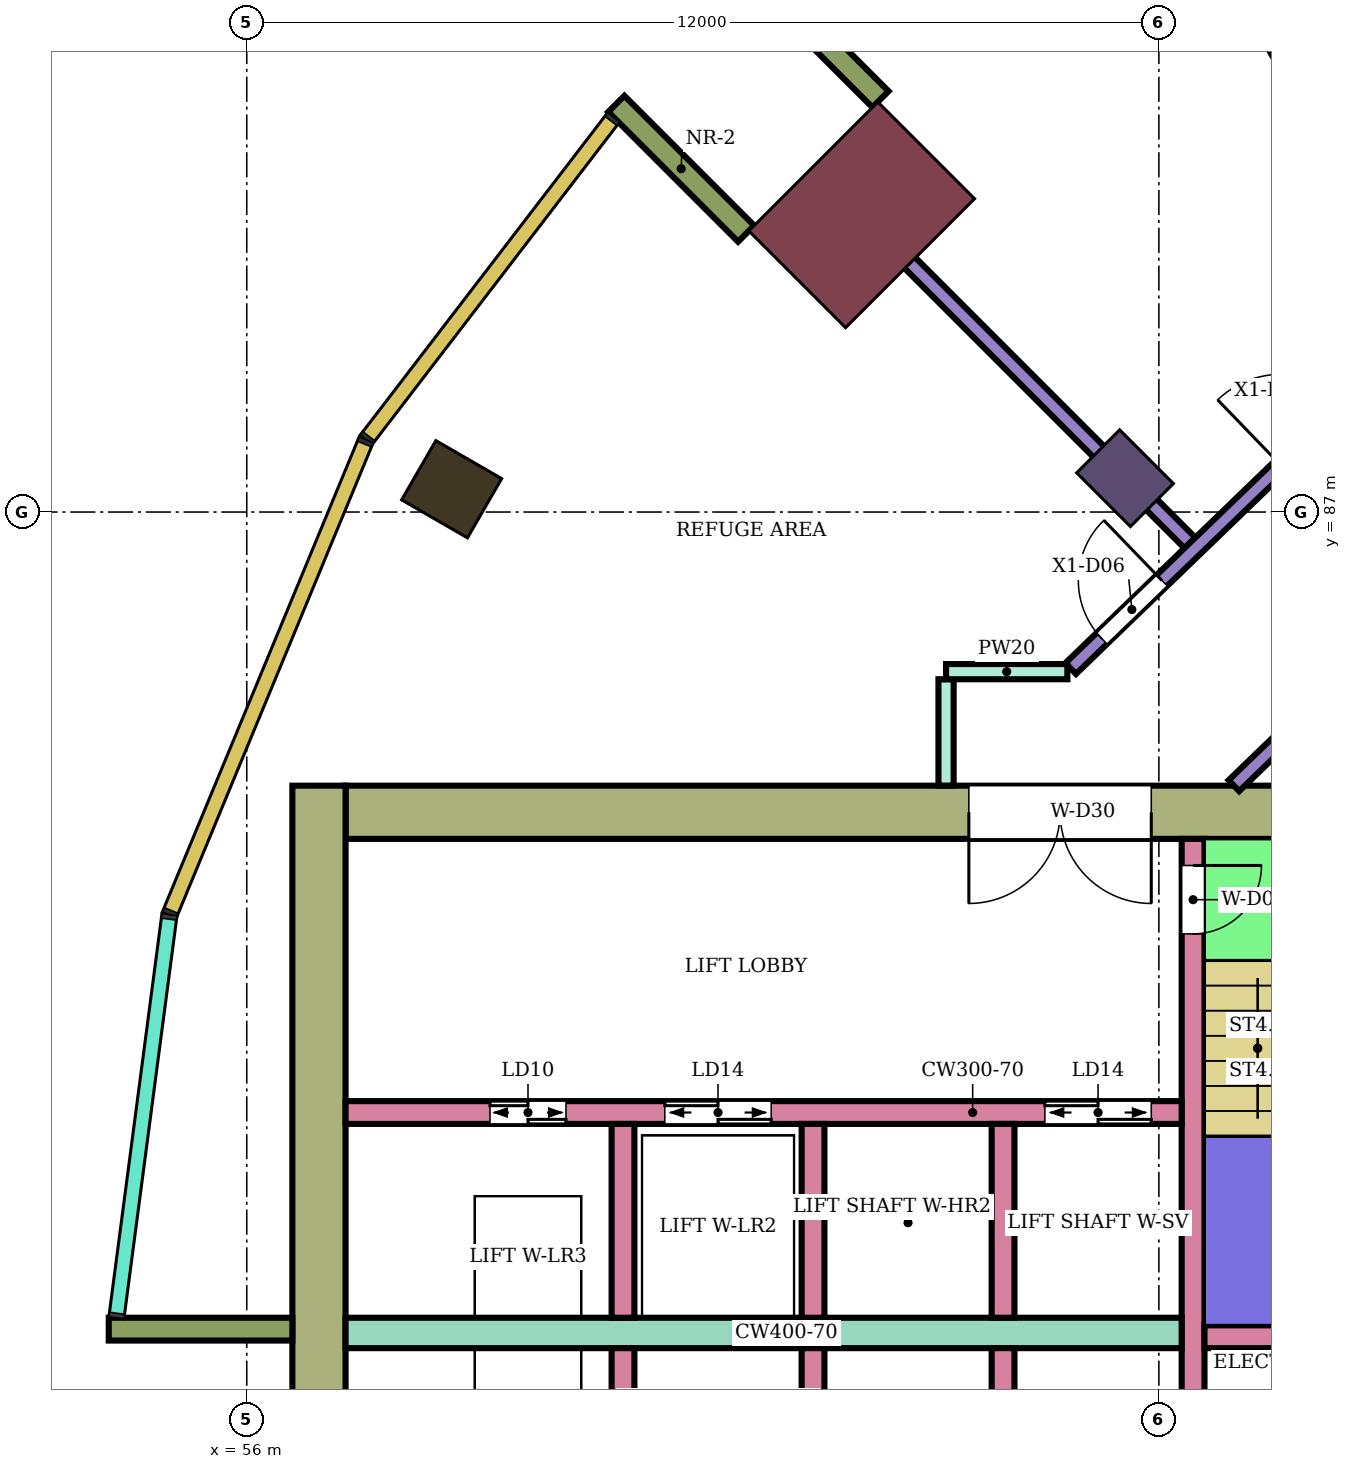
"""IFC4 building model, lengths in metres.
Left out: names, types, materials, properties, quantities, classifications, styles, units other than length and angle.
Written with IfcOpenShell. Run it as: python <this file> out.ifc"""

import sys

from ifc_helpers import new_model, si_unit, direction, frame, frame_2d, origin, origin_2d, place, context, subcontext, project, spatial, rectangle, extrude, element, fill, save


model = new_model("IFC4")
c1 = context("Model", 3, precision=1e-05, world=origin(), true_north=direction((0.0, 1.0)))
c2 = subcontext(c1, "Body", "Model", "MODEL_VIEW")
j1 = project(units=[si_unit("LENGTHUNIT", "METRE"), si_unit("PLANEANGLEUNIT", "RADIAN")], contexts=[c1])
p1 = place(None, origin())
s1 = spatial("IfcSite", under=j1, at=p1, CompositionType="ELEMENT")
p2 = place(p1, origin())
s2 = spatial("IfcBuilding", under=s1, at=p2, CompositionType="ELEMENT")
p3 = place(p2, frame((0.0, 0.0, 109.0)))
s3 = spatial("IfcBuildingStorey", under=s2, at=p3, CompositionType="ELEMENT", Elevation=109.0)
p4 = place(p3, frame((58.696, 87.3, 0.0), z_axis=(0.0, 0.0, 1.0), x_axis=(-0.866025403784, 0.5, 0.0)))
e1 = element("IfcColumn", 1, at=p4, inside=s3, PredefinedType="COLUMN", context=c2, shape_type="SweptSolid", body=[
    extrude(rectangle(XDim=1.0, YDim=0.9, at=origin_2d()), origin(), (0.0, 0.0, 1.0), 5.6),
])
p5 = place(p3, frame((67.555, 87.445, 0.0), z_axis=(0.0, 0.0, 1.0), x_axis=(-0.707106781187, 0.707106781187, 0.0)))
e2 = element("IfcColumn", 2, at=p5, inside=s3, PredefinedType="COLUMN", context=c2, shape_type="SweptSolid", body=[
    extrude(rectangle(XDim=1.0, YDim=0.8, at=origin_2d()), origin(), (0.0, 0.0, 1.0), 5.6),
])
p6 = place(p3, frame((64.09, 90.91, 0.0), z_axis=(0.0, 0.0, 1.0), x_axis=(-0.707106781187, 0.707106781187, 0.0)))
e3 = element("IfcColumn", 3, at=p6, inside=s3, PredefinedType="COLUMN", context=c2, shape_type="SweptSolid", body=[
    extrude(rectangle(XDim=1.8, YDim=2.4, at=origin_2d()), origin(), (0.0, 0.0, 1.0), 5.6),
])
p7 = place(p3, frame((72.1, 83.05, 0.0), z_axis=(0.0, 0.0, 1.0), x_axis=(-1.0, 0.0, 0.0)))
e4 = element("IfcWall", 4, at=p7, inside=s3, PredefinedType="SHEAR", context=c2, shape_type="SweptSolid", body=[
    extrude(rectangle(XDim=14.8, YDim=0.7, at=frame_2d((7.4, 0.0))), origin(), (0.0, 0.0, 1.0), 5.28),
])
p8 = place(p7, frame((4.2, 0.0, 0.0)))
e5 = element("IfcOpeningElement", 5, at=p8, cuts=e4, PredefinedType="OPENING", context=c2, shape_type="SweptSolid", body=[
    extrude(rectangle(XDim=2.4, YDim=2.4, at=frame_2d((1.2, 1.2))), frame((0.0, 0.36, 0.0), z_axis=(0.0, -1.0, 0.0), x_axis=(1.0, 0.0, 0.0)), (0.0, 0.0, 1.0), 0.72),
])
p9 = place(p3, frame((56.95, 83.4, 0.0), z_axis=(0.0, 0.0, 1.0), x_axis=(0.0, -1.0, 0.0)))
e6 = element("IfcWall", 6, at=p9, inside=s3, PredefinedType="SHEAR", context=c2, shape_type="SweptSolid", body=[
    extrude(rectangle(XDim=16.8, YDim=0.7, at=frame_2d((8.4, 0.0))), origin(), (0.0, 0.0, 1.0), 5.28),
])
p10 = place(p3, frame((68.45, 82.7, 0.0), z_axis=(0.0, 0.0, 1.0), x_axis=(0.0, -1.0, 0.0)))
e7 = element("IfcWall", 7, at=p10, inside=s3, PredefinedType="SHEAR", context=c2, shape_type="SweptSolid", body=[
    extrude(rectangle(XDim=7.7, YDim=0.3, at=frame_2d((3.85, 0.0))), origin(), (0.0, 0.0, 1.0), 5.28),
])
p11 = place(p10, frame((0.35, 0.0, 0.0)))
e8 = element("IfcOpeningElement", 8, at=p11, cuts=e7, PredefinedType="OPENING", context=c2, shape_type="SweptSolid", body=[
    extrude(rectangle(XDim=0.9, YDim=2.1, at=frame_2d((0.45, 1.05))), frame((0.0, 0.16, 0.0), z_axis=(0.0, -1.0, 0.0), x_axis=(1.0, 0.0, 0.0)), (0.0, 0.0, 1.0), 0.32),
])
p12 = place(p3, frame((71.65, 76.15, 0.0), z_axis=(0.0, 0.0, 1.0), x_axis=(-1.0, 0.0, 0.0)))
e9 = element("IfcWall", 9, at=p12, inside=s3, PredefinedType="SHEAR", context=c2, shape_type="SweptSolid", body=[
    extrude(rectangle(XDim=3.05, YDim=0.3, at=frame_2d((1.525, 0.0))), origin(), (0.0, 0.0, 1.0), 5.28),
])
p13 = place(p3, frame((68.3, 76.2, 0.0), z_axis=(0.0, 0.0, 1.0), x_axis=(-1.0, 0.0, 0.0)))
e10 = element("IfcWall", 10, at=p13, inside=s3, PredefinedType="SHEAR", context=c2, shape_type="SweptSolid", body=[
    extrude(rectangle(XDim=11.0, YDim=0.4, at=frame_2d((5.5, 0.0))), origin(), (0.0, 0.0, 1.0), 5.28),
])
p14 = place(p3, frame((68.3, 79.1, 0.0), z_axis=(0.0, 0.0, 1.0), x_axis=(-1.0, 0.0, 0.0)))
e11 = element("IfcWall", 11, at=p14, inside=s3, PredefinedType="SHEAR", context=c2, shape_type="SweptSolid", body=[
    extrude(rectangle(XDim=11.0, YDim=0.3, at=frame_2d((5.5, 0.0))), origin(), (0.0, 0.0, 1.0), 5.28),
])
p15 = place(p14, frame((0.4, 0.0, 0.0)))
e12 = element("IfcOpeningElement", 12, at=p15, cuts=e11, PredefinedType="OPENING", context=c2, shape_type="SweptSolid", body=[
    extrude(rectangle(XDim=1.4, YDim=2.1, at=frame_2d((0.7, 1.05))), frame((0.0, 0.16, 0.0), z_axis=(0.0, -1.0, 0.0), x_axis=(1.0, 0.0, 0.0)), (0.0, 0.0, 1.0), 0.32),
])
p16 = place(p14, frame((5.4, 0.0, 0.0)))
e13 = element("IfcOpeningElement", 13, at=p16, cuts=e11, PredefinedType="OPENING", context=c2, shape_type="SweptSolid", body=[
    extrude(rectangle(XDim=1.4, YDim=2.1, at=frame_2d((0.7, 1.05))), frame((0.0, 0.16, 0.0), z_axis=(0.0, -1.0, 0.0), x_axis=(1.0, 0.0, 0.0)), (0.0, 0.0, 1.0), 0.32),
])
p17 = place(p14, frame((8.1, 0.0, 0.0)))
e14 = element("IfcOpeningElement", 14, at=p17, cuts=e11, PredefinedType="OPENING", context=c2, shape_type="SweptSolid", body=[
    extrude(rectangle(XDim=1.0, YDim=2.1, at=frame_2d((0.5, 1.05))), frame((0.0, 0.16, 0.0), z_axis=(0.0, -1.0, 0.0), x_axis=(1.0, 0.0, 0.0)), (0.0, 0.0, 1.0), 0.32),
])
for number, where, z_axis, x_axis in (
    (15, (65.95, 76.0, 0.0), (0.0, 0.0, 1.0), (0.0, -1.0, 0.0)),
    (16, (63.45, 76.0, 0.0), (0.0, 0.0, 1.0), (0.0, -1.0, 0.0)),
    (17, (60.95, 76.0, 0.0), (0.0, 0.0, 1.0), (0.0, -1.0, 0.0)),
    (18, (65.95, 78.95, 0.0), (0.0, 0.0, 1.0), (0.0, -1.0, 0.0)),
    (19, (63.45, 78.95, 0.0), (0.0, 0.0, 1.0), (0.0, -1.0, 0.0)),
    (20, (60.95, 78.95, 0.0), (0.0, 0.0, 1.0), (0.0, -1.0, 0.0)),
):
    element("IfcWall", number, at=place(p3, frame(where, z_axis=z_axis, x_axis=x_axis)), inside=s3, PredefinedType="SHEAR", context=c2, shape_type="SweptSolid", body=[
        extrude(rectangle(XDim=2.55, YDim=0.3, at=frame_2d((1.275, 0.0))), origin(), (0.0, 0.0, 1.0), 5.28),
    ])
for number, where, z_axis, x_axis in (
    (21, (64.338, 92.43, 0.0), (0.0, 0.0, 1.0), (-0.707, 0.707, 0.0)),
    (22, (62.57, 90.662, 0.0), (0.0, 0.0, 1.0), (-0.707, 0.707, 0.0)),
    (23, (56.6, 76.25, 0.0), (0.0, 0.0, 1.0), (-1.0, 0.0, 0.0)),
):
    element("IfcWall", number, at=place(p3, frame(where, z_axis=z_axis, x_axis=x_axis)), inside=s3, PredefinedType="NOTDEFINED", context=c2, shape_type="SweptSolid", body=[
        extrude(rectangle(XDim=2.416, YDim=0.3, at=frame_2d((1.208, 0.0))), origin(), (0.0, 0.0, 1.0), 5.6),
    ])
p18 = place(p3, frame((63.597, 91.406, 0.0), z_axis=(0.0, 0.0, 1.0), x_axis=(0.707035026478, -0.707178528614, 0.0)))
e24 = element("IfcWall", 24, at=p18, inside=s3, PredefinedType="PARTITIONING", context=c2, shape_type="SweptSolid", body=[
    extrude(rectangle(XDim=6.805, YDim=0.2, at=frame_2d((3.403, 0.0))), origin(), (0.0, 0.0, 1.0), 5.15),
])
p19 = place(p3, frame((66.84, 84.941, 0.0), z_axis=(0.0, 0.0, 1.0), x_axis=(0.719566481028, 0.694423559062, 0.0)))
e25 = element("IfcWall", 25, at=p19, inside=s3, PredefinedType="PARTITIONING", context=c2, shape_type="SweptSolid", body=[
    extrude(rectangle(XDim=6.525, YDim=0.2, at=frame_2d((3.263, 0.0))), origin(), (0.0, 0.0, 1.0), 5.15),
])
p20 = place(p19, frame((3.846, 0.0, 0.0)))
e26 = element("IfcOpeningElement", 26, at=p20, cuts=e25, PredefinedType="OPENING", context=c2, shape_type="SweptSolid", body=[
    extrude(rectangle(XDim=1.2, YDim=2.4, at=frame_2d((0.6, 1.2))), frame((0.0, 0.11, 0.0), z_axis=(0.0, -1.0, 0.0), x_axis=(1.0, 0.0, 0.0)), (0.0, 0.0, 1.0), 0.22),
])
p21 = place(p19, frame((0.568, 0.0, 0.0)))
e27 = element("IfcOpeningElement", 27, at=p21, cuts=e25, PredefinedType="OPENING", context=c2, shape_type="SweptSolid", body=[
    extrude(rectangle(XDim=1.1, YDim=2.1, at=frame_2d((0.55, 1.05))), frame((0.0, 0.11, 0.0), z_axis=(0.0, -1.0, 0.0), x_axis=(1.0, 0.0, 0.0)), (0.0, 0.0, 1.0), 0.22),
])
p22 = place(p3, frame((67.102, 97.342, 0.0), z_axis=(0.0, 0.0, 1.0), x_axis=(0.499997660635, -0.866026754413, 0.0)))
e28 = element("IfcWall", 28, at=p22, inside=s3, PredefinedType="PARTITIONING", context=c2, shape_type="SweptSolid", body=[
    extrude(rectangle(XDim=8.908, YDim=0.2, at=frame_2d((4.454, 0.0))), origin(), (0.0, 0.0, 1.0), 4.586),
])
p23 = place(p3, frame((68.987, 83.4, 0.0), z_axis=(0.0, 0.0, 1.0), x_axis=(0.719547721855, 0.694442996922, 0.0)))
e29 = element("IfcWall", 29, at=p23, inside=s3, PredefinedType="PARTITIONING", context=c2, shape_type="SweptSolid", body=[
    extrude(rectangle(XDim=5.378, YDim=0.2, at=frame_2d((2.689, 0.0))), origin(), (0.0, 0.0, 1.0), 5.15),
])
p24 = place(p23, frame((2.144, 0.0, 0.0)))
e30 = element("IfcOpeningElement", 30, at=p24, cuts=e29, PredefinedType="OPENING", context=c2, shape_type="SweptSolid", body=[
    extrude(rectangle(XDim=1.2, YDim=2.4, at=frame_2d((0.6, 1.2))), frame((0.0, 0.11, 0.0), z_axis=(0.0, -1.0, 0.0), x_axis=(1.0, 0.0, 0.0)), (0.0, 0.0, 1.0), 0.22),
])
p25 = place(p3, frame((65.2, 83.401, 0.0), z_axis=(0.0, 0.0, 1.0), x_axis=(0.0, 1.0, 0.0)))
e31 = element("IfcWall", 31, at=p25, inside=s3, PredefinedType="PARTITIONING", context=c2, shape_type="SweptSolid", body=[
    extrude(rectangle(XDim=1.399, YDim=0.2, at=frame_2d((0.7, 0.0))), origin(), (0.0, 0.0, 1.0), 5.15),
])
p26 = place(p3, frame((65.2, 84.9, 0.0), z_axis=(0.0, 0.0, 1.0), x_axis=(1.0, 0.0, 0.0)))
e32 = element("IfcWall", 32, at=p26, inside=s3, PredefinedType="PARTITIONING", context=c2, shape_type="SweptSolid", body=[
    extrude(rectangle(XDim=1.596, YDim=0.2, at=frame_2d((0.798, 0.0))), origin(), (0.0, 0.0, 1.0), 5.15),
])
p27 = place(p21, origin())
e33 = element("IfcDoor", 33, at=p27, inside=s3, OperationType="SINGLE_SWING_RIGHT", PredefinedType="DOOR", context=c2, shape_type="SweptSolid", body=[
    extrude(rectangle(XDim=1.1, YDim=2.1, at=frame_2d((0.55, 1.05))), frame((0.0, 0.025, 0.0), z_axis=(0.0, -1.0, 0.0), x_axis=(1.0, 0.0, 0.0)), (0.0, 0.0, 1.0), 0.05),
])
fill(e27, e33)
p28 = place(p11, origin())
e34 = element("IfcDoor", 34, at=p28, inside=s3, OperationType="SINGLE_SWING_LEFT", PredefinedType="DOOR", context=c2, shape_type="SweptSolid", body=[
    extrude(rectangle(XDim=0.9, YDim=2.1, at=frame_2d((0.45, 1.05))), frame((0.0, 0.025, 0.0), z_axis=(0.0, -1.0, 0.0), x_axis=(1.0, 0.0, 0.0)), (0.0, 0.0, 1.0), 0.05),
])
fill(e8, e34)
p29 = place(p15, origin())
e35 = element("IfcDoor", 35, at=p29, inside=s3, OperationType="DOUBLE_DOOR_SLIDING", PredefinedType="DOOR", context=c2, shape_type="SweptSolid", body=[
    extrude(rectangle(XDim=1.4, YDim=2.1, at=frame_2d((0.7, 1.05))), frame((0.0, 0.025, 0.0), z_axis=(0.0, -1.0, 0.0), x_axis=(1.0, 0.0, 0.0)), (0.0, 0.0, 1.0), 0.05),
])
fill(e12, e35)
p30 = place(p16, origin())
e36 = element("IfcDoor", 36, at=p30, inside=s3, OperationType="DOUBLE_DOOR_SLIDING", PredefinedType="DOOR", context=c2, shape_type="SweptSolid", body=[
    extrude(rectangle(XDim=1.4, YDim=2.1, at=frame_2d((0.7, 1.05))), frame((0.0, 0.025, 0.0), z_axis=(0.0, -1.0, 0.0), x_axis=(1.0, 0.0, 0.0)), (0.0, 0.0, 1.0), 0.05),
])
fill(e13, e36)
p31 = place(p17, origin())
e37 = element("IfcDoor", 37, at=p31, inside=s3, OperationType="DOUBLE_DOOR_SLIDING", PredefinedType="DOOR", context=c2, shape_type="SweptSolid", body=[
    extrude(rectangle(XDim=1.0, YDim=2.1, at=frame_2d((0.5, 1.05))), frame((0.0, 0.025, 0.0), z_axis=(0.0, -1.0, 0.0), x_axis=(1.0, 0.0, 0.0)), (0.0, 0.0, 1.0), 0.05),
])
fill(e14, e37)
p32 = place(p8, origin())
e38 = element("IfcDoor", 38, at=p32, inside=s3, OperationType="DOUBLE_DOOR_SINGLE_SWING", PredefinedType="DOOR", context=c2, shape_type="SweptSolid", body=[
    extrude(rectangle(XDim=2.4, YDim=2.4, at=frame_2d((1.2, 1.2))), frame((0.0, 0.025, 0.0), z_axis=(0.0, -1.0, 0.0), x_axis=(1.0, 0.0, 0.0)), (0.0, 0.0, 1.0), 0.05),
])
fill(e5, e38)
save(model, sys.argv[1])
